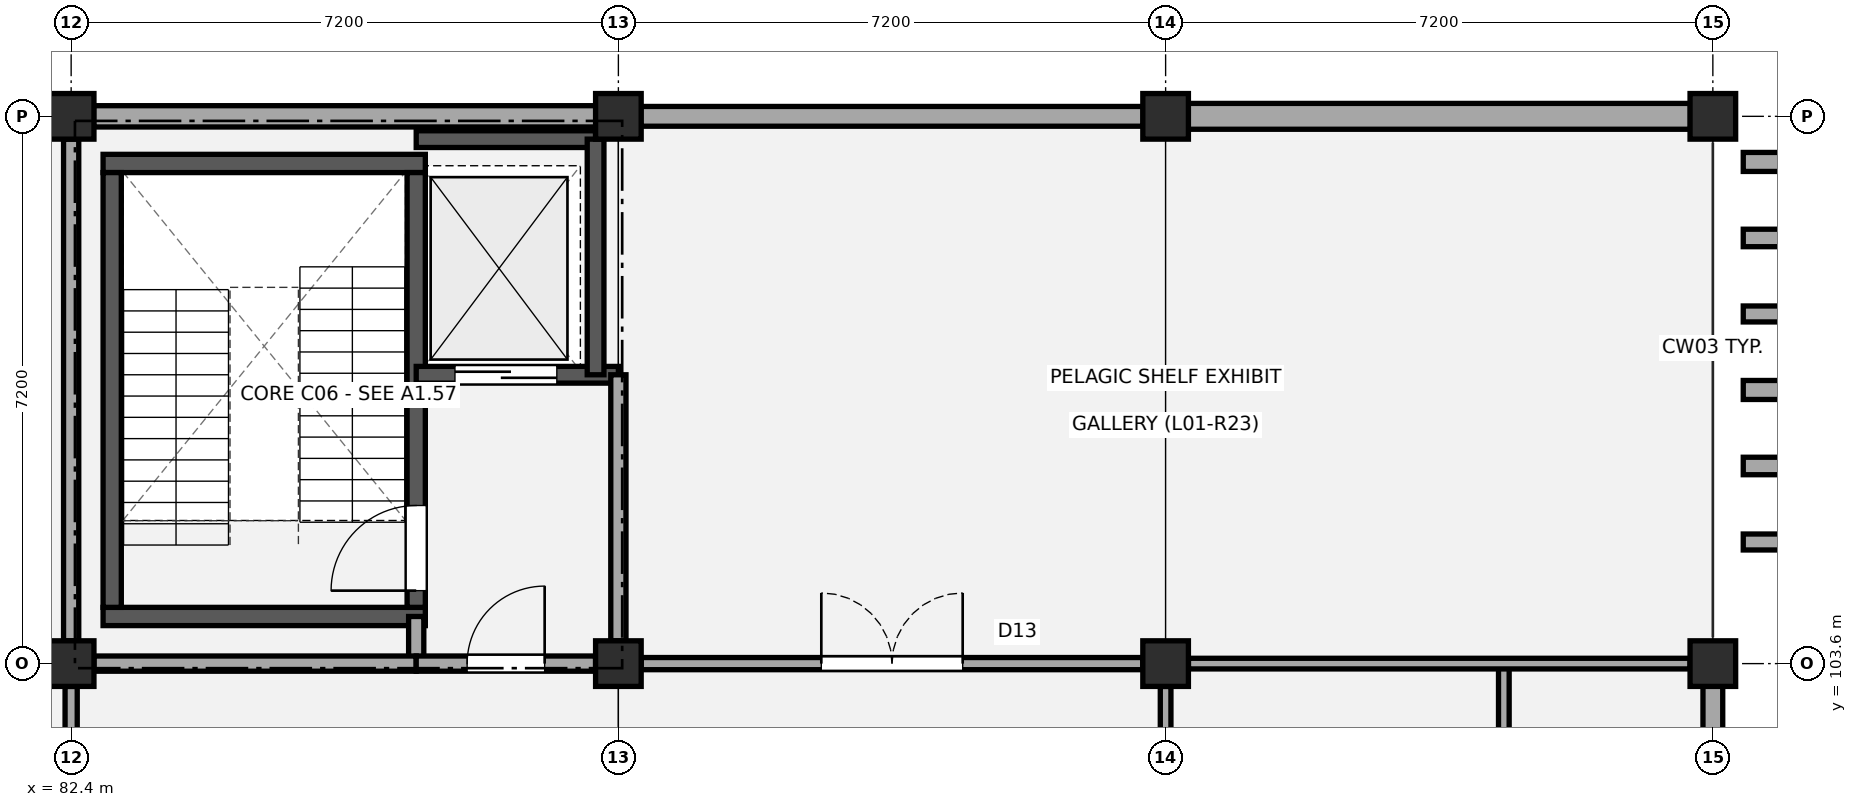
"""IFC4 building model, lengths in metres.
Left out: names, types, materials, properties, quantities, classifications, styles, units other than length and angle.
Written with IfcOpenShell. Run it as: python <this file> out.ifc"""

import sys

from ifc_helpers import new_model, si_unit, direction, frame, frame_2d, origin, origin_2d, place, context, subcontext, project, spatial, polyline, rectangle, outline, extrude, element, fill, save


model = new_model("IFC4")
c1 = context("Model", 3, precision=1e-05, world=origin(), true_north=direction((0.0, 1.0)))
c2 = subcontext(c1, "Body", "Model", "MODEL_VIEW")
j1 = project(units=[si_unit("LENGTHUNIT", "METRE"), si_unit("PLANEANGLEUNIT", "RADIAN")], contexts=[c1])
p1 = place(None, origin())
s1 = spatial("IfcSite", under=j1, at=p1, CompositionType="ELEMENT")
p2 = place(p1, origin())
s2 = spatial("IfcBuilding", under=s1, at=p2, CompositionType="ELEMENT")
p3 = place(p2, frame((0.0, 0.0, 4.68)))
s3 = spatial("IfcBuildingStorey", under=s2, at=p3, CompositionType="ELEMENT", Elevation=4.68)
for number, where, z_axis, x_axis in (
    (1, (82.4, 103.6, 0.0), (0.0, 0.0, 1.0), (1.0, 0.0, 0.0)),
    (2, (82.4, 110.8, 0.0), (0.0, 0.0, 1.0), (1.0, 0.0, 0.0)),
    (3, (89.6, 103.6, 0.0), (0.0, 0.0, 1.0), (1.0, 0.0, 0.0)),
    (4, (89.6, 110.8, 0.0), (0.0, 0.0, 1.0), (1.0, 0.0, 0.0)),
    (5, (96.8, 103.6, 0.0), (0.0, 0.0, 1.0), (1.0, 0.0, 0.0)),
    (6, (96.8, 110.8, 0.0), (0.0, 0.0, 1.0), (1.0, 0.0, 0.0)),
    (7, (104.0, 103.6, 0.0), (0.0, 0.0, 1.0), (1.0, 0.0, 0.0)),
    (8, (104.0, 110.8, 0.0), (0.0, 0.0, 1.0), (1.0, 0.0, 0.0)),
):
    element("IfcColumn", number, at=place(p3, frame(where, z_axis=z_axis, x_axis=x_axis)), inside=s3, PredefinedType="COLUMN", context=c2, shape_type="SweptSolid", body=[
        extrude(rectangle(XDim=0.6, YDim=0.6, at=origin_2d()), origin(), (0.0, 0.0, 1.0), 4.5),
    ])
p4 = place(p3, frame((82.695, 110.8, 0.0), z_axis=(0.0, 0.0, 1.0), x_axis=(1.0, 0.0, 0.0)))
e9 = element("IfcWall", 9, at=p4, inside=s3, PredefinedType="STANDARD", context=c2, shape_type="SweptSolid", body=[
    extrude(rectangle(XDim=6.61, YDim=0.28, at=frame_2d((3.305, 0.0))), origin(), (0.0, 0.0, 1.0), 3.51),
])
p5 = place(p3, frame((89.895, 110.8, 0.0), z_axis=(0.0, 0.0, 1.0), x_axis=(1.0, 0.0, 0.0)))
e10 = element("IfcWall", 10, at=p5, inside=s3, PredefinedType="STANDARD", context=c2, shape_type="SweptSolid", body=[
    extrude(rectangle(XDim=6.61, YDim=0.26, at=frame_2d((3.305, 0.0))), origin(), (0.0, 0.0, 1.0), 3.49),
])
p6 = place(p3, frame((97.095, 110.8, 0.0), z_axis=(0.0, 0.0, 1.0), x_axis=(1.0, 0.0, 0.0)))
e11 = element("IfcWall", 11, at=p6, inside=s3, PredefinedType="STANDARD", context=c2, shape_type="SweptSolid", body=[
    extrude(rectangle(XDim=6.61, YDim=0.34, at=frame_2d((3.305, 0.0))), origin(), (0.0, 0.0, 1.0), 3.51),
])
p7 = place(p3, frame((104.0, 103.305, 0.0), z_axis=(0.0, 0.0, 1.0), x_axis=(0.0, -1.0, 0.0)))
e12 = element("IfcWall", 12, at=p7, inside=s3, PredefinedType="STANDARD", context=c2, shape_type="SweptSolid", body=[
    extrude(rectangle(XDim=6.61, YDim=0.26, at=frame_2d((3.305, 0.0))), origin(), (0.0, 0.0, 1.0), 3.49),
])
p8 = place(p3, frame((104.4, 110.2, -0.3), z_axis=(0.0, 0.0, 1.0), x_axis=(1.0, 0.0, 0.0)))
e13 = element("IfcWall", 13, at=p8, inside=s3, PredefinedType="PARAPET", context=c2, shape_type="SweptSolid", body=[
    extrude(outline(polyline([(0.0, 0.0), (13.6, 0.0), (13.6, 2.5), (10.2, 3.0), (6.8, 3.2), (3.4, 3.0), (0.0, 2.5), (0.0, 0.0)])), frame((0.0, 0.125, 0.0), z_axis=(0.0, -1.0, 0.0), x_axis=(1.0, 0.0, 0.0)), (0.0, 0.0, 1.0), 0.25),
])
p9 = place(p3, frame((104.4, 109.2, -0.3), z_axis=(0.0, 0.0, 1.0), x_axis=(1.0, 0.0, 0.0)))
e14 = element("IfcWall", 14, at=p9, inside=s3, PredefinedType="PARAPET", context=c2, shape_type="SweptSolid", body=[
    extrude(outline(polyline([(0.0, 0.0), (13.6, 0.0), (13.6, 2.26), (10.2, 2.76), (6.8, 2.96), (3.4, 2.76), (0.0, 2.26), (0.0, 0.0)])), frame((0.0, 0.115, 0.0), z_axis=(0.0, -1.0, 0.0), x_axis=(1.0, 0.0, 0.0)), (0.0, 0.0, 1.0), 0.23),
])
p10 = place(p3, frame((104.4, 108.2, -0.3), z_axis=(0.0, 0.0, 1.0), x_axis=(1.0, 0.0, 0.0)))
e15 = element("IfcWall", 15, at=p10, inside=s3, PredefinedType="PARAPET", context=c2, shape_type="SweptSolid", body=[
    extrude(outline(polyline([(0.0, 0.0), (13.6, 0.0), (13.6, 2.02), (10.2, 2.52), (6.8, 2.72), (3.4, 2.52), (0.0, 2.02), (0.0, 0.0)])), frame((0.0, 0.105, 0.0), z_axis=(0.0, -1.0, 0.0), x_axis=(1.0, 0.0, 0.0)), (0.0, 0.0, 1.0), 0.21),
])
p11 = place(p3, frame((104.4, 107.2, -0.3), z_axis=(0.0, 0.0, 1.0), x_axis=(1.0, 0.0, 0.0)))
e16 = element("IfcWall", 16, at=p11, inside=s3, PredefinedType="PARAPET", context=c2, shape_type="SweptSolid", body=[
    extrude(outline(polyline([(0.0, 0.0), (13.6, 0.0), (13.6, 1.78), (10.2, 2.28), (6.8, 2.48), (3.4, 2.28), (0.0, 1.78), (0.0, 0.0)])), frame((0.0, 0.125, 0.0), z_axis=(0.0, -1.0, 0.0), x_axis=(1.0, 0.0, 0.0)), (0.0, 0.0, 1.0), 0.25),
])
p12 = place(p3, frame((104.4, 106.2, -0.3), z_axis=(0.0, 0.0, 1.0), x_axis=(1.0, 0.0, 0.0)))
e17 = element("IfcWall", 17, at=p12, inside=s3, PredefinedType="PARAPET", context=c2, shape_type="SweptSolid", body=[
    extrude(outline(polyline([(0.0, 0.0), (13.6, 0.0), (13.6, 1.54), (10.2, 2.04), (6.8, 2.24), (3.4, 2.04), (0.0, 1.54), (0.0, 0.0)])), frame((0.0, 0.115, 0.0), z_axis=(0.0, -1.0, 0.0), x_axis=(1.0, 0.0, 0.0)), (0.0, 0.0, 1.0), 0.23),
])
p13 = place(p3, frame((104.4, 105.2, -0.3), z_axis=(0.0, 0.0, 1.0), x_axis=(1.0, 0.0, 0.0)))
e18 = element("IfcWall", 18, at=p13, inside=s3, PredefinedType="PARAPET", context=c2, shape_type="SweptSolid", body=[
    extrude(outline(polyline([(0.0, 0.0), (13.6, 0.0), (13.6, 1.3), (10.2, 1.8), (6.8, 2.0), (3.4, 1.8), (0.0, 1.3), (0.0, 0.0)])), frame((0.0, 0.105, 0.0), z_axis=(0.0, -1.0, 0.0), x_axis=(1.0, 0.0, 0.0)), (0.0, 0.0, 1.0), 0.21),
])
for number, where, z_axis, x_axis in (
    (19, (82.82, 104.22, 0.0), (0.0, 0.0, 1.0), (1.0, 0.0, 0.0)),
    (20, (82.82, 110.18, 0.0), (0.0, 0.0, 1.0), (1.0, 0.0, 0.0)),
):
    element("IfcWall", number, at=place(p3, frame(where, z_axis=z_axis, x_axis=x_axis)), inside=s3, PredefinedType="SHEAR", context=c2, shape_type="SweptSolid", body=[
        extrude(rectangle(XDim=4.24, YDim=0.24, at=frame_2d((2.12, 0.0))), origin(), (0.0, 0.0, 1.0), 4.22),
    ])
p14 = place(p3, frame((82.94, 104.34, 0.0), z_axis=(0.0, 0.0, 1.0), x_axis=(0.0, 1.0, 0.0)))
e21 = element("IfcWall", 21, at=p14, inside=s3, PredefinedType="SHEAR", context=c2, shape_type="SweptSolid", body=[
    extrude(rectangle(XDim=5.72, YDim=0.24, at=frame_2d((2.86, 0.0))), origin(), (0.0, 0.0, 1.0), 4.22),
])
p15 = place(p3, frame((86.94, 104.34, 0.0), z_axis=(0.0, 0.0, 1.0), x_axis=(0.0, 1.0, 0.0)))
e22 = element("IfcWall", 22, at=p15, inside=s3, PredefinedType="SHEAR", context=c2, shape_type="SweptSolid", body=[
    extrude(rectangle(XDim=5.72, YDim=0.24, at=frame_2d((2.86, 0.0))), origin(), (0.0, 0.0, 1.0), 4.22),
])
p16 = place(p15, frame((0.22, 0.0, 0.0)))
e23 = element("IfcOpeningElement", 23, at=p16, cuts=e22, PredefinedType="OPENING", context=c2, shape_type="SweptSolid", body=[
    extrude(rectangle(XDim=1.12, YDim=2.15, at=frame_2d((0.56, 1.075))), frame((0.0, 0.13, 0.0), z_axis=(0.0, -1.0, 0.0), x_axis=(1.0, 0.0, 0.0)), (0.0, 0.0, 1.0), 0.26),
])
p17 = place(p3, frame((86.94, 107.4, 0.0), z_axis=(0.0, 0.0, 1.0), x_axis=(1.0, 0.0, 0.0)))
e24 = element("IfcWall", 24, at=p17, inside=s3, PredefinedType="SHEAR", context=c2, shape_type="SweptSolid", body=[
    extrude(rectangle(XDim=2.66, YDim=0.22, at=frame_2d((1.33, 0.0))), origin(), (0.0, 0.0, 1.0), 4.22),
])
p18 = place(p17, frame((0.51, 0.0, 0.0)))
e25 = element("IfcOpeningElement", 25, at=p18, cuts=e24, PredefinedType="OPENING", context=c2, shape_type="SweptSolid", body=[
    extrude(rectangle(XDim=1.34, YDim=2.15, at=frame_2d((0.67, 1.075))), frame((0.0, 0.12, 0.0), z_axis=(0.0, -1.0, 0.0), x_axis=(1.0, 0.0, 0.0)), (0.0, 0.0, 1.0), 0.24),
])
p19 = place(p3, frame((86.94, 110.5, 0.0), z_axis=(0.0, 0.0, 1.0), x_axis=(1.0, 0.0, 0.0)))
e26 = element("IfcWall", 26, at=p19, inside=s3, PredefinedType="SHEAR", context=c2, shape_type="SweptSolid", body=[
    extrude(rectangle(XDim=2.36, YDim=0.22, at=frame_2d((1.18, 0.0))), origin(), (0.0, 0.0, 1.0), 4.22),
])
p20 = place(p3, frame((89.3, 107.4, 0.0), z_axis=(0.0, 0.0, 1.0), x_axis=(0.0, 1.0, 0.0)))
e27 = element("IfcWall", 27, at=p20, inside=s3, PredefinedType="SHEAR", context=c2, shape_type="SweptSolid", body=[
    extrude(rectangle(XDim=3.1, YDim=0.22, at=frame_2d((1.55, 0.0))), origin(), (0.0, 0.0, 1.0), 4.22),
])
p21 = place(p3, frame((86.94, 103.6, 0.0), z_axis=(0.0, 0.0, 1.0), x_axis=(0.0, 1.0, 0.0)))
e28 = element("IfcWall", 28, at=p21, inside=s3, PredefinedType="PARTITIONING", context=c2, shape_type="SweptSolid", body=[
    extrude(rectangle(XDim=0.62, YDim=0.2, at=frame_2d((0.31, 0.0))), origin(), (0.0, 0.0, 1.0), 3.59),
])
p22 = place(p3, frame((82.4, 103.9, 0.0), z_axis=(0.0, 0.0, 1.0), x_axis=(0.0, 1.0, 0.0)))
e29 = element("IfcWall", 29, at=p22, inside=s3, PredefinedType="PARTITIONING", context=c2, shape_type="SweptSolid", body=[
    extrude(rectangle(XDim=6.6, YDim=0.2, at=frame_2d((3.3, 0.0))), origin(), (0.0, 0.0, 1.0), 3.54),
])
p23 = place(p3, frame((89.6, 103.9, 0.0), z_axis=(0.0, 0.0, 1.0), x_axis=(0.0, 1.0, 0.0)))
e30 = element("IfcWall", 30, at=p23, inside=s3, PredefinedType="PARTITIONING", context=c2, shape_type="SweptSolid", body=[
    extrude(rectangle(XDim=3.5, YDim=0.2, at=frame_2d((1.75, 0.0))), origin(), (0.0, 0.0, 1.0), 3.54),
])
p24 = place(p3, frame((82.7, 103.6, 0.0), z_axis=(0.0, 0.0, 1.0), x_axis=(1.0, 0.0, 0.0)))
e31 = element("IfcWall", 31, at=p24, inside=s3, PredefinedType="PARTITIONING", context=c2, shape_type="SweptSolid", body=[
    extrude(rectangle(XDim=4.24, YDim=0.2, at=frame_2d((2.12, 0.0))), origin(), (0.0, 0.0, 1.0), 3.59),
])
p25 = place(p3, frame((86.94, 103.6, 0.0), z_axis=(0.0, 0.0, 1.0), x_axis=(1.0, 0.0, 0.0)))
e32 = element("IfcWall", 32, at=p25, inside=s3, PredefinedType="PARTITIONING", context=c2, shape_type="SweptSolid", body=[
    extrude(rectangle(XDim=2.36, YDim=0.2, at=frame_2d((1.18, 0.0))), origin(), (0.0, 0.0, 1.0), 3.59),
])
p26 = place(p25, frame((0.67, 0.0, 0.0)))
e33 = element("IfcOpeningElement", 33, at=p26, cuts=e32, PredefinedType="OPENING", context=c2, shape_type="SweptSolid", body=[
    extrude(rectangle(XDim=1.02, YDim=2.15, at=frame_2d((0.51, 1.075))), frame((0.0, 0.11, 0.0), z_axis=(0.0, -1.0, 0.0), x_axis=(1.0, 0.0, 0.0)), (0.0, 0.0, 1.0), 0.22),
])
p27 = place(p3, frame((101.25, 96.4, 0.0), z_axis=(0.0, 0.0, 1.0), x_axis=(0.0, 1.0, 0.0)))
e34 = element("IfcWall", 34, at=p27, inside=s3, PredefinedType="PARTITIONING", context=c2, shape_type="SweptSolid", body=[
    extrude(rectangle(XDim=7.2, YDim=0.14, at=frame_2d((3.6, 0.0))), origin(), (0.0, 0.0, 1.0), 3.62),
])
p28 = place(p3, frame((97.1, 103.6, 0.0), z_axis=(0.0, 0.0, 1.0), x_axis=(1.0, 0.0, 0.0)))
e35 = element("IfcWall", 35, at=p28, inside=s3, PredefinedType="PARTITIONING", context=c2, shape_type="SweptSolid", body=[
    extrude(rectangle(XDim=6.6, YDim=0.14, at=frame_2d((3.3, 0.0))), origin(), (0.0, 0.0, 1.0), 3.59),
])
p29 = place(p3, frame((96.8, 96.7, 0.0), z_axis=(0.0, 0.0, 1.0), x_axis=(0.0, 1.0, 0.0)))
e36 = element("IfcWall", 36, at=p29, inside=s3, PredefinedType="PARTITIONING", context=c2, shape_type="SweptSolid", body=[
    extrude(rectangle(XDim=6.6, YDim=0.14, at=frame_2d((3.3, 0.0))), origin(), (0.0, 0.0, 1.0), 3.59),
])
p30 = place(p3, frame((82.4, 96.7, 0.0), z_axis=(0.0, 0.0, 1.0), x_axis=(0.0, 1.0, 0.0)))
e37 = element("IfcWall", 37, at=p30, inside=s3, PredefinedType="PARTITIONING", context=c2, shape_type="SweptSolid", body=[
    extrude(rectangle(XDim=6.6, YDim=0.16, at=frame_2d((3.3, 0.0))), origin(), (0.0, 0.0, 1.0), 3.59),
])
p31 = place(p30, frame((2.47, 0.0, 0.0)))
e38 = element("IfcOpeningElement", 38, at=p31, cuts=e37, PredefinedType="OPENING", context=c2, shape_type="SweptSolid", body=[
    extrude(rectangle(XDim=1.66, YDim=2.22, at=frame_2d((0.83, 1.11))), frame((0.0, 0.09, 0.0), z_axis=(0.0, -1.0, 0.0), x_axis=(1.0, 0.0, 0.0)), (0.0, 0.0, 1.0), 0.18),
])
p32 = place(p3, frame((89.9, 103.6, 0.0), z_axis=(0.0, 0.0, 1.0), x_axis=(1.0, 0.0, 0.0)))
e39 = element("IfcWall", 39, at=p32, inside=s3, PredefinedType="PARTITIONING", context=c2, shape_type="SweptSolid", body=[
    extrude(rectangle(XDim=6.6, YDim=0.16, at=frame_2d((3.3, 0.0))), origin(), (0.0, 0.0, 1.0), 3.54),
])
p33 = place(p32, frame((2.37, 0.0, 0.0)))
e40 = element("IfcOpeningElement", 40, at=p33, cuts=e39, PredefinedType="OPENING", context=c2, shape_type="SweptSolid", body=[
    extrude(rectangle(XDim=1.86, YDim=2.26, at=frame_2d((0.93, 1.13))), frame((0.0, 0.09, 0.0), z_axis=(0.0, -1.0, 0.0), x_axis=(1.0, 0.0, 0.0)), (0.0, 0.0, 1.0), 0.18),
])
p34 = place(p16, origin())
e41 = element("IfcDoor", 41, at=p34, inside=s3, OperationType="SINGLE_SWING_LEFT", PredefinedType="DOOR", context=c2, shape_type="SweptSolid", body=[
    extrude(rectangle(XDim=1.12, YDim=2.15, at=frame_2d((0.56, 1.075))), frame((0.0, 0.025, 0.0), z_axis=(0.0, -1.0, 0.0), x_axis=(1.0, 0.0, 0.0)), (0.0, 0.0, 1.0), 0.05),
])
fill(e23, e41)
p35 = place(p18, origin())
e42 = element("IfcDoor", 42, at=p35, inside=s3, OperationType="DOUBLE_DOOR_SLIDING", PredefinedType="DOOR", context=c2, shape_type="SweptSolid", body=[
    extrude(rectangle(XDim=1.34, YDim=2.15, at=frame_2d((0.67, 1.075))), frame((0.0, 0.025, 0.0), z_axis=(0.0, -1.0, 0.0), x_axis=(1.0, 0.0, 0.0)), (0.0, 0.0, 1.0), 0.05),
])
fill(e25, e42)
p36 = place(p26, origin())
e43 = element("IfcDoor", 43, at=p36, inside=s3, OperationType="SINGLE_SWING_RIGHT", PredefinedType="DOOR", context=c2, shape_type="SweptSolid", body=[
    extrude(rectangle(XDim=1.02, YDim=2.15, at=frame_2d((0.51, 1.075))), frame((0.0, 0.025, 0.0), z_axis=(0.0, -1.0, 0.0), x_axis=(1.0, 0.0, 0.0)), (0.0, 0.0, 1.0), 0.05),
])
fill(e33, e43)
p37 = place(p33, origin())
e44 = element("IfcDoor", 44, at=p37, inside=s3, OperationType="DOUBLE_DOOR_SINGLE_SWING", PredefinedType="DOOR", context=c2, shape_type="SweptSolid", body=[
    extrude(rectangle(XDim=1.86, YDim=2.26, at=frame_2d((0.93, 1.13))), frame((0.0, 0.025, 0.0), z_axis=(0.0, -1.0, 0.0), x_axis=(1.0, 0.0, 0.0)), (0.0, 0.0, 1.0), 0.05),
])
fill(e40, e44)
save(model, sys.argv[1])
